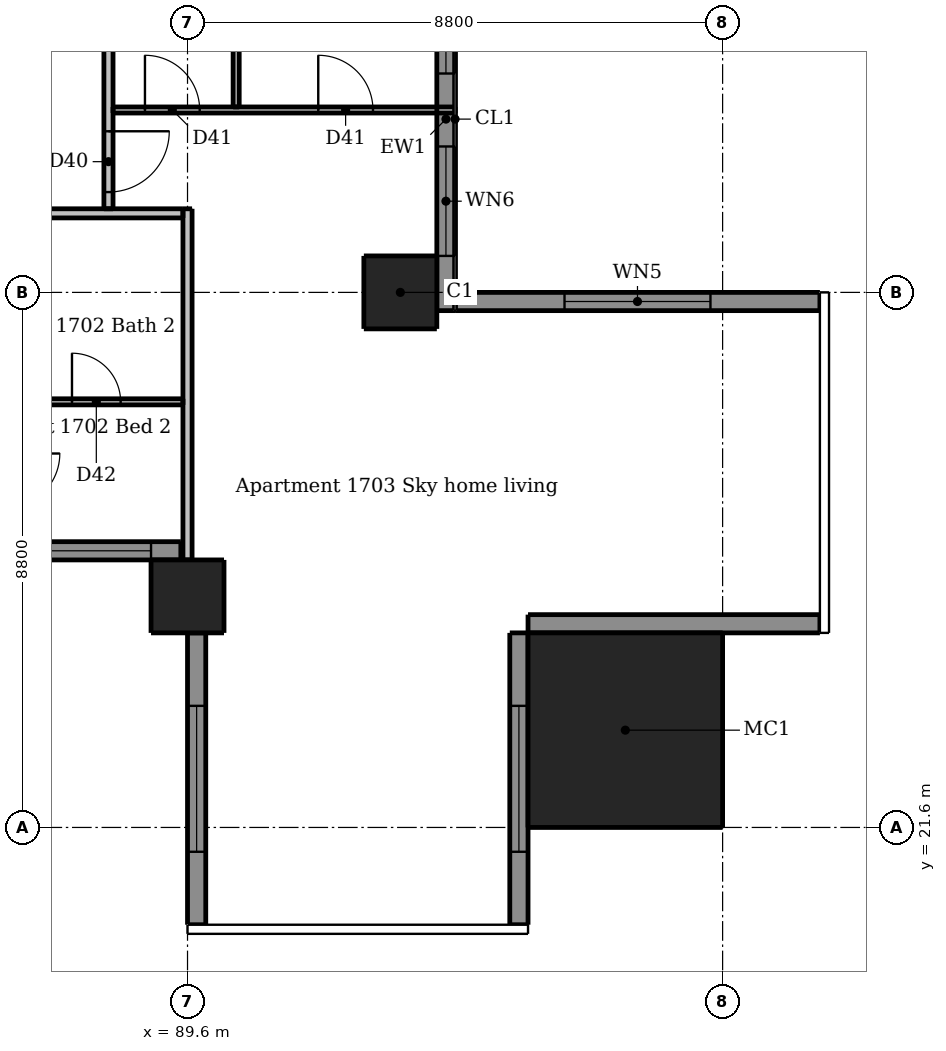
"""IFC4 building model, lengths in metres.
Left out: names, types, materials, properties, quantities, classifications, styles, units other than length and angle.
Written with IfcOpenShell. Run it as: python <this file> out.ifc"""

import sys

from ifc_helpers import new_model, si_unit, direction, frame, frame_2d, origin, origin_2d, place, context, subcontext, project, spatial, rectangle, extrude, element, fill, save


model = new_model("IFC4")
c1 = context("Model", 3, precision=1e-05, world=origin(), true_north=direction((0.0, 1.0)))
c2 = subcontext(c1, "Body", "Model", "MODEL_VIEW")
j1 = project(units=[si_unit("LENGTHUNIT", "METRE"), si_unit("PLANEANGLEUNIT", "RADIAN")], contexts=[c1])
p1 = place(None, origin())
s1 = spatial("IfcSite", under=j1, at=p1, CompositionType="ELEMENT")
p2 = place(p1, origin())
s2 = spatial("IfcBuilding", under=s1, at=p2, CompositionType="ELEMENT")
p3 = place(p2, frame((0.0, 0.0, 63.1)))
s3 = spatial("IfcBuildingStorey", under=s2, at=p3, CompositionType="ELEMENT", Elevation=63.1)
for number, where, z_axis, x_axis in (
    (1, (89.6, 25.4, 0.0), (0.0, 0.0, 1.0), (1.0, 0.0, 0.0)),
    (2, (93.1, 30.4, 0.0), (0.0, 0.0, 1.0), (1.0, 0.0, 0.0)),
):
    element("IfcColumn", number, at=place(p3, frame(where, z_axis=z_axis, x_axis=x_axis)), inside=s3, PredefinedType="COLUMN", context=c2, shape_type="SweptSolid", body=[
        extrude(rectangle(XDim=1.2, YDim=1.2, at=origin_2d()), origin(), (0.0, 0.0, 1.0), 3.05),
    ])
p4 = place(p3, frame((96.8, 23.2, 0.0), z_axis=(0.0, 0.0, 1.0), x_axis=(1.0, 0.0, 0.0)))
e3 = element("IfcColumn", 3, at=p4, inside=s3, PredefinedType="COLUMN", context=c2, shape_type="SweptSolid", body=[
    extrude(rectangle(XDim=3.2, YDim=3.2, at=origin_2d()), origin(), (0.0, 0.0, 1.0), 3.3),
])
p5 = place(p3, frame((89.75, 24.8, 0.0), z_axis=(0.0, 0.0, 1.0), x_axis=(0.0, -1.0, 0.0)))
e4 = element("IfcWall", 4, at=p5, inside=s3, PredefinedType="SOLIDWALL", context=c2, shape_type="SweptSolid", body=[
    extrude(rectangle(XDim=4.8, YDim=0.3, at=frame_2d((2.4, 0.0))), origin(), (0.0, 0.0, 1.0), 3.05),
])
p6 = place(p5, frame((1.2, 0.0, 0.15)))
e5 = element("IfcOpeningElement", 5, at=p6, cuts=e4, PredefinedType="OPENING", context=c2, shape_type="SweptSolid", body=[
    extrude(rectangle(XDim=2.4, YDim=2.1, at=frame_2d((1.2, 1.05))), frame((0.0, 0.16, 0.0), z_axis=(0.0, -1.0, 0.0), x_axis=(1.0, 0.0, 0.0)), (0.0, 0.0, 1.0), 0.32),
])
p7 = place(p3, frame((95.05, 20.0, 0.0), z_axis=(0.0, 0.0, 1.0), x_axis=(0.0, 1.0, 0.0)))
e6 = element("IfcWall", 6, at=p7, inside=s3, PredefinedType="SOLIDWALL", context=c2, shape_type="SweptSolid", body=[
    extrude(rectangle(XDim=4.8, YDim=0.3, at=frame_2d((2.4, 0.0))), origin(), (0.0, 0.0, 1.0), 3.05),
])
p8 = place(p7, frame((1.2, 0.0, 0.15)))
e7 = element("IfcOpeningElement", 7, at=p8, cuts=e6, PredefinedType="OPENING", context=c2, shape_type="SweptSolid", body=[
    extrude(rectangle(XDim=2.4, YDim=2.1, at=frame_2d((1.2, 1.05))), frame((0.0, 0.16, 0.0), z_axis=(0.0, -1.0, 0.0), x_axis=(1.0, 0.0, 0.0)), (0.0, 0.0, 1.0), 0.32),
])
p9 = place(p3, frame((95.2, 24.95, 0.0), z_axis=(0.0, 0.0, 1.0), x_axis=(1.0, 0.0, 0.0)))
e8 = element("IfcWall", 8, at=p9, inside=s3, PredefinedType="SOLIDWALL", context=c2, shape_type="SweptSolid", body=[
    extrude(rectangle(XDim=4.8, YDim=0.3, at=frame_2d((2.4, 0.0))), origin(), (0.0, 0.0, 1.0), 3.05),
])
p10 = place(p3, frame((100.0, 30.25, 0.0), z_axis=(0.0, 0.0, 1.0), x_axis=(-1.0, 0.0, 0.0)))
e9 = element("IfcWall", 9, at=p10, inside=s3, PredefinedType="SOLIDWALL", context=c2, shape_type="SweptSolid", body=[
    extrude(rectangle(XDim=6.0, YDim=0.3, at=frame_2d((3.0, 0.0))), origin(), (0.0, 0.0, 1.0), 3.05),
])
p11 = place(p10, frame((1.8, 0.0, 0.15)))
e10 = element("IfcOpeningElement", 10, at=p11, cuts=e9, PredefinedType="OPENING", context=c2, shape_type="SweptSolid", body=[
    extrude(rectangle(XDim=2.4, YDim=2.1, at=frame_2d((1.2, 1.05))), frame((0.0, 0.16, 0.0), z_axis=(0.0, -1.0, 0.0), x_axis=(1.0, 0.0, 0.0)), (0.0, 0.0, 1.0), 0.32),
])
p12 = place(p3, frame((83.6, 26.15, 0.0), z_axis=(0.0, 0.0, 1.0), x_axis=(1.0, 0.0, 0.0)))
e11 = element("IfcWall", 11, at=p12, inside=s3, PredefinedType="SOLIDWALL", context=c2, shape_type="SweptSolid", body=[
    extrude(rectangle(XDim=5.89, YDim=0.3, at=frame_2d((2.945, 0.0))), origin(), (0.0, 0.0, 1.0), 3.05),
])
p13 = place(p12, frame((0.6, 0.0, 0.15)))
e12 = element("IfcOpeningElement", 12, at=p13, cuts=e11, PredefinedType="OPENING", context=c2, shape_type="SweptSolid", body=[
    extrude(rectangle(XDim=1.8, YDim=2.1, at=frame_2d((0.9, 1.05))), frame((0.0, 0.16, 0.0), z_axis=(0.0, -1.0, 0.0), x_axis=(1.0, 0.0, 0.0)), (0.0, 0.0, 1.0), 0.32),
])
p14 = place(p12, frame((3.6, 0.0, 0.15)))
e13 = element("IfcOpeningElement", 13, at=p14, cuts=e11, PredefinedType="OPENING", context=c2, shape_type="SweptSolid", body=[
    extrude(rectangle(XDim=1.8, YDim=2.1, at=frame_2d((0.9, 1.05))), frame((0.0, 0.16, 0.0), z_axis=(0.0, -1.0, 0.0), x_axis=(1.0, 0.0, 0.0)), (0.0, 0.0, 1.0), 0.32),
])
p15 = place(p3, frame((93.85, 30.1, 0.0), z_axis=(0.0, 0.0, 1.0), x_axis=(0.0, 1.0, 0.0)))
e14 = element("IfcWall", 14, at=p15, inside=s3, PredefinedType="SOLIDWALL", context=c2, shape_type="SweptSolid", body=[
    extrude(rectangle(XDim=6.3, YDim=0.3, at=frame_2d((3.15, 0.0))), origin(), (0.0, 0.0, 1.0), 3.05),
])
p16 = place(p15, frame((0.9, 0.0, 0.15)))
e15 = element("IfcOpeningElement", 15, at=p16, cuts=e14, PredefinedType="OPENING", context=c2, shape_type="SweptSolid", body=[
    extrude(rectangle(XDim=1.8, YDim=2.1, at=frame_2d((0.9, 1.05))), frame((0.0, 0.16, 0.0), z_axis=(0.0, -1.0, 0.0), x_axis=(1.0, 0.0, 0.0)), (0.0, 0.0, 1.0), 0.32),
])
p17 = place(p15, frame((3.9, 0.0, 0.15)))
e16 = element("IfcOpeningElement", 16, at=p17, cuts=e14, PredefinedType="OPENING", context=c2, shape_type="SweptSolid", body=[
    extrude(rectangle(XDim=1.8, YDim=2.1, at=frame_2d((0.9, 1.05))), frame((0.0, 0.16, 0.0), z_axis=(0.0, -1.0, 0.0), x_axis=(1.0, 0.0, 0.0)), (0.0, 0.0, 1.0), 0.32),
])
p18 = place(p3, frame((90.4, 33.45, 0.0), z_axis=(0.0, 0.0, 1.0), x_axis=(0.0, 1.0, 0.0)))
e17 = element("IfcWall", 17, at=p18, inside=s3, PredefinedType="PARTITIONING", context=c2, shape_type="SweptSolid", body=[
    extrude(rectangle(XDim=9.1, YDim=0.1, at=frame_2d((4.55, 0.0))), origin(), (0.0, 0.0, 1.0), 3.05),
])
p19 = place(p18, frame((3.8, 0.0, 0.0)))
e18 = element("IfcOpeningElement", 18, at=p19, cuts=e17, PredefinedType="OPENING", context=c2, shape_type="SweptSolid", body=[
    extrude(rectangle(XDim=0.8, YDim=2.1, at=frame_2d((0.4, 1.05))), frame((0.0, 0.06, 0.0), z_axis=(0.0, -1.0, 0.0), x_axis=(1.0, 0.0, 0.0)), (0.0, 0.0, 1.0), 0.12),
])
p20 = place(p18, frame((7.1, 0.0, 0.0)))
e19 = element("IfcOpeningElement", 19, at=p20, cuts=e17, PredefinedType="OPENING", context=c2, shape_type="SweptSolid", body=[
    extrude(rectangle(XDim=0.9, YDim=2.1, at=frame_2d((0.45, 1.05))), frame((0.0, 0.06, 0.0), z_axis=(0.0, -1.0, 0.0), x_axis=(1.0, 0.0, 0.0)), (0.0, 0.0, 1.0), 0.12),
])
p21 = place(p3, frame((88.375, 33.4, 0.0), z_axis=(0.0, 0.0, 1.0), x_axis=(1.0, 0.0, 0.0)))
e20 = element("IfcWall", 20, at=p21, inside=s3, PredefinedType="PARTITIONING", context=c2, shape_type="SweptSolid", body=[
    extrude(rectangle(XDim=5.625, YDim=0.1, at=frame_2d((2.812, 0.0))), origin(), (0.0, 0.0, 1.0), 3.05),
])
p22 = place(p21, frame((0.525, 0.0, 0.0)))
e21 = element("IfcOpeningElement", 21, at=p22, cuts=e20, PredefinedType="OPENING", context=c2, shape_type="SweptSolid", body=[
    extrude(rectangle(XDim=0.9, YDim=2.1, at=frame_2d((0.45, 1.05))), frame((0.0, 0.06, 0.0), z_axis=(0.0, -1.0, 0.0), x_axis=(1.0, 0.0, 0.0)), (0.0, 0.0, 1.0), 0.12),
])
p23 = place(p21, frame((3.375, 0.0, 0.0)))
e22 = element("IfcOpeningElement", 22, at=p23, cuts=e20, PredefinedType="OPENING", context=c2, shape_type="SweptSolid", body=[
    extrude(rectangle(XDim=0.9, YDim=2.1, at=frame_2d((0.45, 1.05))), frame((0.0, 0.06, 0.0), z_axis=(0.0, -1.0, 0.0), x_axis=(1.0, 0.0, 0.0)), (0.0, 0.0, 1.0), 0.12),
])
p24 = place(p3, frame((83.65, 28.6, 0.0), z_axis=(0.0, 0.0, 1.0), x_axis=(1.0, 0.0, 0.0)))
e23 = element("IfcWall", 23, at=p24, inside=s3, PredefinedType="PARTITIONING", context=c2, shape_type="SweptSolid", body=[
    extrude(rectangle(XDim=5.875, YDim=0.1, at=frame_2d((2.938, 0.0))), origin(), (0.0, 0.0, 1.0), 3.05),
])
p25 = place(p24, frame((4.05, 0.0, 0.0)))
e24 = element("IfcOpeningElement", 24, at=p25, cuts=e23, PredefinedType="OPENING", context=c2, shape_type="SweptSolid", body=[
    extrude(rectangle(XDim=0.8, YDim=2.1, at=frame_2d((0.4, 1.05))), frame((0.0, 0.06, 0.0), z_axis=(0.0, -1.0, 0.0), x_axis=(1.0, 0.0, 0.0)), (0.0, 0.0, 1.0), 0.12),
])
p26 = place(p3, frame((88.3, 60.475, 0.0), z_axis=(0.0, 0.0, 1.0), x_axis=(0.0, -1.0, 0.0)))
e25 = element("IfcWall", 25, at=p26, inside=s3, PredefinedType="PARTITIONING", context=c2, shape_type="SweptSolid", body=[
    extrude(rectangle(XDim=28.7, YDim=0.15, at=frame_2d((14.35, 0.0))), origin(), (0.0, 0.0, 1.0), 3.05),
])
p27 = place(p26, frame((27.425, 0.0, 0.0)))
e26 = element("IfcOpeningElement", 26, at=p27, cuts=e25, PredefinedType="OPENING", context=c2, shape_type="SweptSolid", body=[
    extrude(rectangle(XDim=1.0, YDim=2.1, at=frame_2d((0.5, 1.05))), frame((0.0, 0.085, 0.0), z_axis=(0.0, -1.0, 0.0), x_axis=(1.0, 0.0, 0.0)), (0.0, 0.0, 1.0), 0.17),
])
p28 = place(p26, frame((14.525, 0.0, 0.0)))
e27 = element("IfcOpeningElement", 27, at=p28, cuts=e25, PredefinedType="OPENING", context=c2, shape_type="SweptSolid", body=[
    extrude(rectangle(XDim=1.0, YDim=2.1, at=frame_2d((0.5, 1.05))), frame((0.0, 0.085, 0.0), z_axis=(0.0, -1.0, 0.0), x_axis=(1.0, 0.0, 0.0)), (0.0, 0.0, 1.0), 0.17),
])
p29 = place(p26, frame((3.775, 0.0, 0.0)))
e28 = element("IfcOpeningElement", 28, at=p29, cuts=e25, PredefinedType="OPENING", context=c2, shape_type="SweptSolid", body=[
    extrude(rectangle(XDim=1.0, YDim=2.1, at=frame_2d((0.5, 1.05))), frame((0.0, 0.085, 0.0), z_axis=(0.0, -1.0, 0.0), x_axis=(1.0, 0.0, 0.0)), (0.0, 0.0, 1.0), 0.17),
])
p30 = place(p3, frame((89.6, 26.0, 0.0), z_axis=(0.0, 0.0, 1.0), x_axis=(0.0, 1.0, 0.0)))
e29 = element("IfcWall", 29, at=p30, inside=s3, PredefinedType="PARTITIONING", context=c2, shape_type="SweptSolid", body=[
    extrude(rectangle(XDim=5.775, YDim=0.15, at=frame_2d((2.887, 0.0))), origin(), (0.0, 0.0, 1.0), 2.516),
])
p31 = place(p3, frame((89.525, 31.7, 0.0), z_axis=(0.0, 0.0, 1.0), x_axis=(-1.0, 0.0, 0.0)))
e30 = element("IfcWall", 30, at=p31, inside=s3, PredefinedType="PARTITIONING", context=c2, shape_type="SweptSolid", body=[
    extrude(rectangle(XDim=28.75, YDim=0.15, at=frame_2d((14.375, 0.0))), origin(), (0.0, 0.0, 1.0), 3.05),
])
p32 = place(p31, frame((24.625, 0.0, 0.0)))
e31 = element("IfcOpeningElement", 31, at=p32, cuts=e30, PredefinedType="OPENING", context=c2, shape_type="SweptSolid", body=[
    extrude(rectangle(XDim=1.0, YDim=2.1, at=frame_2d((0.5, 1.05))), frame((0.0, 0.085, 0.0), z_axis=(0.0, -1.0, 0.0), x_axis=(1.0, 0.0, 0.0)), (0.0, 0.0, 1.0), 0.17),
])
p33 = place(p31, frame((8.425, 0.0, 0.0)))
e32 = element("IfcOpeningElement", 32, at=p33, cuts=e30, PredefinedType="OPENING", context=c2, shape_type="SweptSolid", body=[
    extrude(rectangle(XDim=1.0, YDim=2.1, at=frame_2d((0.5, 1.05))), frame((0.0, 0.085, 0.0), z_axis=(0.0, -1.0, 0.0), x_axis=(1.0, 0.0, 0.0)), (0.0, 0.0, 1.0), 0.17),
])
p34 = place(p6, origin())
e33 = element("IfcWindow", 33, at=p34, inside=s3, PartitioningType="DOUBLE_PANEL_VERTICAL", PredefinedType="WINDOW", context=c2, shape_type="SweptSolid", body=[
    extrude(rectangle(XDim=2.4, YDim=2.1, at=frame_2d((1.2, 1.05))), frame((0.0, 0.03, 0.0), z_axis=(0.0, -1.0, 0.0), x_axis=(1.0, 0.0, 0.0)), (0.0, 0.0, 1.0), 0.06),
])
fill(e5, e33)
p35 = place(p8, origin())
e34 = element("IfcWindow", 34, at=p35, inside=s3, PartitioningType="DOUBLE_PANEL_VERTICAL", PredefinedType="WINDOW", context=c2, shape_type="SweptSolid", body=[
    extrude(rectangle(XDim=2.4, YDim=2.1, at=frame_2d((1.2, 1.05))), frame((0.0, 0.03, 0.0), z_axis=(0.0, -1.0, 0.0), x_axis=(1.0, 0.0, 0.0)), (0.0, 0.0, 1.0), 0.06),
])
fill(e7, e34)
p36 = place(p11, origin())
e35 = element("IfcWindow", 35, at=p36, inside=s3, PartitioningType="DOUBLE_PANEL_VERTICAL", PredefinedType="WINDOW", context=c2, shape_type="SweptSolid", body=[
    extrude(rectangle(XDim=2.4, YDim=2.1, at=frame_2d((1.2, 1.05))), frame((0.0, 0.03, 0.0), z_axis=(0.0, -1.0, 0.0), x_axis=(1.0, 0.0, 0.0)), (0.0, 0.0, 1.0), 0.06),
])
fill(e10, e35)
p37 = place(p14, origin())
e36 = element("IfcWindow", 36, at=p37, inside=s3, PartitioningType="DOUBLE_PANEL_VERTICAL", PredefinedType="WINDOW", context=c2, shape_type="SweptSolid", body=[
    extrude(rectangle(XDim=1.8, YDim=2.1, at=frame_2d((0.9, 1.05))), frame((0.0, 0.03, 0.0), z_axis=(0.0, -1.0, 0.0), x_axis=(1.0, 0.0, 0.0)), (0.0, 0.0, 1.0), 0.06),
])
fill(e13, e36)
p38 = place(p16, origin())
e37 = element("IfcWindow", 37, at=p38, inside=s3, PartitioningType="DOUBLE_PANEL_VERTICAL", PredefinedType="WINDOW", context=c2, shape_type="SweptSolid", body=[
    extrude(rectangle(XDim=1.8, YDim=2.1, at=frame_2d((0.9, 1.05))), frame((0.0, 0.03, 0.0), z_axis=(0.0, -1.0, 0.0), x_axis=(1.0, 0.0, 0.0)), (0.0, 0.0, 1.0), 0.06),
])
fill(e15, e37)
p39 = place(p17, origin())
e38 = element("IfcWindow", 38, at=p39, inside=s3, PartitioningType="DOUBLE_PANEL_VERTICAL", PredefinedType="WINDOW", context=c2, shape_type="SweptSolid", body=[
    extrude(rectangle(XDim=1.8, YDim=2.1, at=frame_2d((0.9, 1.05))), frame((0.0, 0.03, 0.0), z_axis=(0.0, -1.0, 0.0), x_axis=(1.0, 0.0, 0.0)), (0.0, 0.0, 1.0), 0.06),
])
fill(e16, e38)
p40 = place(p25, origin())
e39 = element("IfcDoor", 39, at=p40, inside=s3, OperationType="SINGLE_SWING_LEFT", PredefinedType="DOOR", context=c2, shape_type="SweptSolid", body=[
    extrude(rectangle(XDim=0.8, YDim=2.1, at=frame_2d((0.4, 1.05))), frame((0.0, 0.025, 0.0), z_axis=(0.0, -1.0, 0.0), x_axis=(1.0, 0.0, 0.0)), (0.0, 0.0, 1.0), 0.05),
])
fill(e24, e39)
p41 = place(p27, origin())
e40 = element("IfcDoor", 40, at=p41, inside=s3, OperationType="SINGLE_SWING_LEFT", PredefinedType="DOOR", context=c2, shape_type="SweptSolid", body=[
    extrude(rectangle(XDim=1.0, YDim=2.1, at=frame_2d((0.5, 1.05))), frame((0.0, 0.025, 0.0), z_axis=(0.0, -1.0, 0.0), x_axis=(1.0, 0.0, 0.0)), (0.0, 0.0, 1.0), 0.05),
])
fill(e26, e40)
p42 = place(p22, origin())
e41 = element("IfcDoor", 41, at=p42, inside=s3, OperationType="SINGLE_SWING_LEFT", PredefinedType="DOOR", context=c2, shape_type="SweptSolid", body=[
    extrude(rectangle(XDim=0.9, YDim=2.1, at=frame_2d((0.45, 1.05))), frame((0.0, 0.025, 0.0), z_axis=(0.0, -1.0, 0.0), x_axis=(1.0, 0.0, 0.0)), (0.0, 0.0, 1.0), 0.05),
])
fill(e21, e41)
p43 = place(p23, origin())
e42 = element("IfcDoor", 42, at=p43, inside=s3, OperationType="SINGLE_SWING_LEFT", PredefinedType="DOOR", context=c2, shape_type="SweptSolid", body=[
    extrude(rectangle(XDim=0.9, YDim=2.1, at=frame_2d((0.45, 1.05))), frame((0.0, 0.025, 0.0), z_axis=(0.0, -1.0, 0.0), x_axis=(1.0, 0.0, 0.0)), (0.0, 0.0, 1.0), 0.05),
])
fill(e22, e42)
save(model, sys.argv[1])
